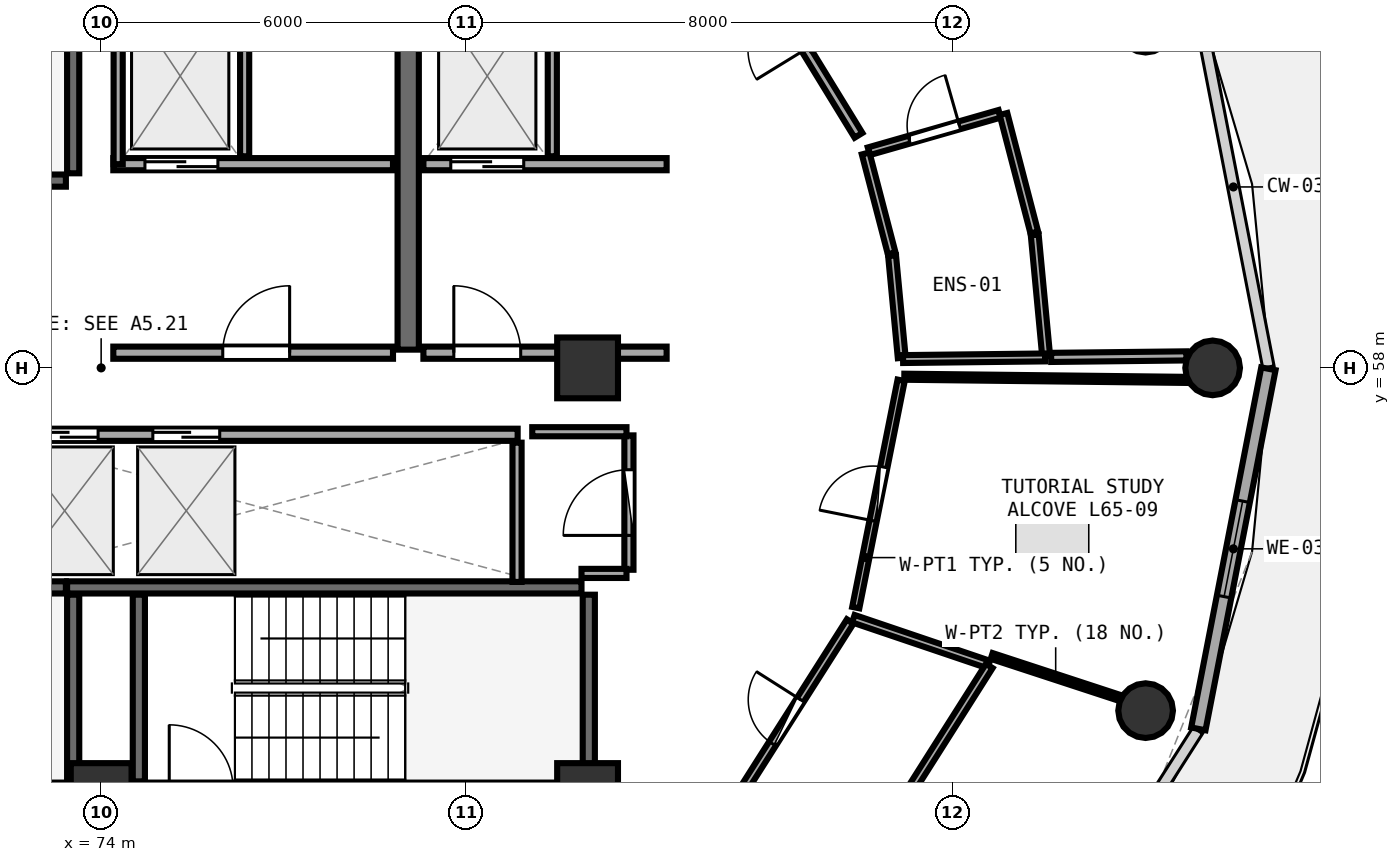
"""IFC4 building model, lengths in metres.
Left out: names, types, materials, properties, quantities, classifications, styles, units other than length and angle.
Written with IfcOpenShell. Run it as: python <this file> out.ifc"""

import sys

from ifc_helpers import new_model, si_unit, direction, frame, frame_2d, origin, origin_2d, place, context, subcontext, project, spatial, rectangle, circle, extrude, element, fill, save


model = new_model("IFC4")
c1 = context("Model", 3, precision=1e-05, world=origin(), true_north=direction((0.0, 1.0)))
c2 = subcontext(c1, "Body", "Model", "MODEL_VIEW")
j1 = project(units=[si_unit("LENGTHUNIT", "METRE"), si_unit("PLANEANGLEUNIT", "RADIAN")], contexts=[c1])
p1 = place(None, origin())
s1 = spatial("IfcSite", under=j1, at=p1, CompositionType="ELEMENT")
p2 = place(p1, origin())
s2 = spatial("IfcBuilding", under=s1, at=p2, CompositionType="ELEMENT")
p3 = place(p2, frame((0.0, 0.0, 256.2)))
s3 = spatial("IfcBuildingStorey", under=s2, at=p3, CompositionType="ELEMENT", Elevation=256.2)
for number, where, z_axis, x_axis in (
    (1, (74.0, 51.0, 0.0), (0.0, 0.0, 1.0), (1.0, 0.0, 0.0)),
    (2, (82.0, 51.0, 0.0), (0.0, 0.0, 1.0), (1.0, 0.0, 0.0)),
    (3, (82.0, 58.0, 0.0), (0.0, 0.0, 1.0), (1.0, 0.0, 0.0)),
):
    element("IfcColumn", number, at=place(p3, frame(where, z_axis=z_axis, x_axis=x_axis)), inside=s3, PredefinedType="PILASTER", context=c2, shape_type="SweptSolid", body=[
        extrude(rectangle(XDim=1.0, YDim=1.0, at=origin_2d()), origin(), (0.0, 0.0, 1.0), 3.75),
    ])
for number, where, z_axis, x_axis in (
    (4, (92.28, 58.0, 0.0), (0.0, 0.0, 1.0), (1.0, 0.0, 0.0)),
    (5, (91.177, 63.636, 0.0), (0.0, 0.0, 1.0), (1.0, 0.0, 0.0)),
    (6, (91.177, 52.364, 0.0), (0.0, 0.0, 1.0), (1.0, 0.0, 0.0)),
):
    element("IfcColumn", number, at=place(p3, frame(where, z_axis=z_axis, x_axis=x_axis)), inside=s3, PredefinedType="COLUMN", context=c2, shape_type="SweptSolid", body=[
        extrude(circle(Radius=0.45, at=origin_2d()), origin(), (0.0, 0.0, 1.0), 3.75),
    ])
p4 = place(p3, frame((92.045, 52.063, 0.0), z_axis=(0.0, 0.0, 1.0), x_axis=(0.190969309115, 0.981596008028, 0.0)))
e7 = element("IfcWall", 7, at=p4, inside=s3, PredefinedType="SOLIDWALL", context=c2, shape_type="SweptSolid", body=[
    extrude(rectangle(XDim=6.033, YDim=0.24, at=frame_2d((3.017, 0.0))), origin(), (0.0, 0.0, 1.0), 3.475),
])
p5 = place(p4, frame((2.216, 0.0, 0.85)))
e8 = element("IfcOpeningElement", 8, at=p5, cuts=e7, PredefinedType="OPENING", context=c2, shape_type="SweptSolid", body=[
    extrude(rectangle(XDim=1.6, YDim=1.45, at=frame_2d((0.8, 0.725))), frame((0.0, 0.13, 0.0), z_axis=(0.0, -1.0, 0.0), x_axis=(1.0, 0.0, 0.0)), (0.0, 0.0, 1.0), 0.26),
])
p6 = place(p3, frame((66.26, 61.08, 0.0), z_axis=(0.0, 0.0, 1.0), x_axis=(1.0, 0.0, 0.0)))
e9 = element("IfcWall", 9, at=p6, inside=s3, PredefinedType="SHEAR", context=c2, shape_type="SweptSolid", body=[
    extrude(rectangle(XDim=7.16, YDim=0.2, at=frame_2d((3.58, 0.0))), origin(), (0.0, 0.0, 1.0), 3.49),
])
for number, where, z_axis, x_axis in (
    (10, (73.54, 61.2, 0.0), (0.0, 0.0, 1.0), (0.0, 1.0, 0.0)),
    (11, (82.02, 51.2, 0.0), (0.0, 0.0, 1.0), (0.0, 1.0, 0.0)),
):
    element("IfcWall", number, at=place(p3, frame(where, z_axis=z_axis, x_axis=x_axis)), inside=s3, PredefinedType="SHEAR", context=c2, shape_type="SweptSolid", body=[
        extrude(rectangle(XDim=3.07, YDim=0.2, at=frame_2d((1.535, 0.0))), origin(), (0.0, 0.0, 1.0), 3.49),
    ])
p7 = place(p3, frame((81.9, 54.39, 0.0), z_axis=(0.0, 0.0, 1.0), x_axis=(-1.0, 0.0, 0.0)))
e12 = element("IfcWall", 12, at=p7, inside=s3, PredefinedType="SHEAR", context=c2, shape_type="SweptSolid", body=[
    extrude(rectangle(XDim=8.46, YDim=0.2, at=frame_2d((4.23, 0.0))), origin(), (0.0, 0.0, 1.0), 3.49),
])
for number, where, z_axis, x_axis in (
    (13, (74.62, 54.27, 0.0), (0.0, 0.0, 1.0), (0.0, -1.0, 0.0)),
    (14, (73.54, 51.2, 0.0), (0.0, 0.0, 1.0), (0.0, 1.0, 0.0)),
):
    element("IfcWall", number, at=place(p3, frame(where, z_axis=z_axis, x_axis=x_axis)), inside=s3, PredefinedType="SHEAR", context=c2, shape_type="SweptSolid", body=[
        extrude(rectangle(XDim=3.07, YDim=0.2, at=frame_2d((1.535, 0.0))), origin(), (0.0, 0.0, 1.0), 3.49),
    ])
p8 = place(p3, frame((73.42, 54.39, 0.0), z_axis=(0.0, 0.0, 1.0), x_axis=(-1.0, 0.0, 0.0)))
e15 = element("IfcWall", 15, at=p8, inside=s3, PredefinedType="SHEAR", context=c2, shape_type="SweptSolid", body=[
    extrude(rectangle(XDim=7.16, YDim=0.2, at=frame_2d((3.58, 0.0))), origin(), (0.0, 0.0, 1.0), 3.49),
])
p9 = place(p3, frame((79.05, 58.3, 0.0), z_axis=(0.0, 0.0, 1.0), x_axis=(0.0, 1.0, 0.0)))
e16 = element("IfcWall", 16, at=p9, inside=s3, PredefinedType="SHEAR", context=c2, shape_type="SweptSolid", body=[
    extrude(rectangle(XDim=6.3, YDim=0.35, at=frame_2d((3.15, 0.0))), origin(), (0.0, 0.0, 1.0), 3.49),
])
p10 = place(p3, frame((74.2, 61.35, 0.0), z_axis=(0.0, 0.0, 1.0), x_axis=(1.0, 0.0, 0.0)))
e17 = element("IfcWall", 17, at=p10, inside=s3, PredefinedType="SOLIDWALL", context=c2, shape_type="SweptSolid", body=[
    extrude(rectangle(XDim=4.6, YDim=0.2, at=frame_2d((2.3, 0.0))), origin(), (0.0, 0.0, 1.0), 3.48),
])
p11 = place(p10, frame((0.52, 0.0, 0.0)))
e18 = element("IfcOpeningElement", 18, at=p11, cuts=e17, PredefinedType="OPENING", context=c2, shape_type="SweptSolid", body=[
    extrude(rectangle(XDim=1.2, YDim=2.15, at=frame_2d((0.6, 1.075))), frame((0.0, 0.11, 0.0), z_axis=(0.0, -1.0, 0.0), x_axis=(1.0, 0.0, 0.0)), (0.0, 0.0, 1.0), 0.22),
])
p12 = place(p3, frame((74.28, 61.35, 0.0), z_axis=(0.0, 0.0, 1.0), x_axis=(0.0, 1.0, 0.0)))
e19 = element("IfcWall", 19, at=p12, inside=s3, PredefinedType="PARTITIONING", context=c2, shape_type="SweptSolid", body=[
    extrude(rectangle(XDim=2.97, YDim=0.15, at=frame_2d((1.485, 0.0))), origin(), (0.0, 0.0, 1.0), 3.48),
])
p13 = place(p3, frame((76.36, 61.48, 0.0), z_axis=(0.0, 0.0, 1.0), x_axis=(0.0, 1.0, 0.0)))
e20 = element("IfcWall", 20, at=p13, inside=s3, PredefinedType="PARTITIONING", context=c2, shape_type="SweptSolid", body=[
    extrude(rectangle(XDim=2.84, YDim=0.15, at=frame_2d((1.42, 0.0))), origin(), (0.0, 0.0, 1.0), 3.48),
])
p14 = place(p3, frame((79.3, 61.35, 0.0), z_axis=(0.0, 0.0, 1.0), x_axis=(1.0, 0.0, 0.0)))
e21 = element("IfcWall", 21, at=p14, inside=s3, PredefinedType="SOLIDWALL", context=c2, shape_type="SweptSolid", body=[
    extrude(rectangle(XDim=4.0, YDim=0.2, at=frame_2d((2.0, 0.0))), origin(), (0.0, 0.0, 1.0), 2.775),
])
p15 = place(p14, frame((0.45, 0.0, 0.0)))
e22 = element("IfcOpeningElement", 22, at=p15, cuts=e21, PredefinedType="OPENING", context=c2, shape_type="SweptSolid", body=[
    extrude(rectangle(XDim=1.2, YDim=2.15, at=frame_2d((0.6, 1.075))), frame((0.0, 0.11, 0.0), z_axis=(0.0, -1.0, 0.0), x_axis=(1.0, 0.0, 0.0)), (0.0, 0.0, 1.0), 0.22),
])
p16 = place(p3, frame((81.42, 61.48, 0.0), z_axis=(0.0, 0.0, 1.0), x_axis=(0.0, 1.0, 0.0)))
e23 = element("IfcWall", 23, at=p16, inside=s3, PredefinedType="PARTITIONING", context=c2, shape_type="SweptSolid", body=[
    extrude(rectangle(XDim=2.84, YDim=0.15, at=frame_2d((1.42, 0.0))), origin(), (0.0, 0.0, 1.0), 3.48),
])
p17 = place(p3, frame((74.2, 58.25, 0.0), z_axis=(0.0, 0.0, 1.0), x_axis=(1.0, 0.0, 0.0)))
e24 = element("IfcWall", 24, at=p17, inside=s3, PredefinedType="SOLIDWALL", context=c2, shape_type="SweptSolid", body=[
    extrude(rectangle(XDim=4.6, YDim=0.2, at=frame_2d((2.3, 0.0))), origin(), (0.0, 0.0, 1.0), 3.48),
])
p18 = place(p17, frame((1.8, 0.0, 0.0)))
e25 = element("IfcOpeningElement", 25, at=p18, cuts=e24, PredefinedType="OPENING", context=c2, shape_type="SweptSolid", body=[
    extrude(rectangle(XDim=1.1, YDim=2.1, at=frame_2d((0.55, 1.05))), frame((0.0, 0.11, 0.0), z_axis=(0.0, -1.0, 0.0), x_axis=(1.0, 0.0, 0.0)), (0.0, 0.0, 1.0), 0.22),
])
p19 = place(p3, frame((79.3, 58.25, 0.0), z_axis=(0.0, 0.0, 1.0), x_axis=(1.0, 0.0, 0.0)))
e26 = element("IfcWall", 26, at=p19, inside=s3, PredefinedType="SOLIDWALL", context=c2, shape_type="SweptSolid", body=[
    extrude(rectangle(XDim=4.0, YDim=0.2, at=frame_2d((2.0, 0.0))), origin(), (0.0, 0.0, 1.0), 2.775),
])
p20 = place(p19, frame((0.5, 0.0, 0.0)))
e27 = element("IfcOpeningElement", 27, at=p20, cuts=e26, PredefinedType="OPENING", context=c2, shape_type="SweptSolid", body=[
    extrude(rectangle(XDim=1.1, YDim=2.1, at=frame_2d((0.55, 1.05))), frame((0.0, 0.11, 0.0), z_axis=(0.0, -1.0, 0.0), x_axis=(1.0, 0.0, 0.0)), (0.0, 0.0, 1.0), 0.22),
])
p21 = place(p3, frame((72.45, 56.9, 0.0), z_axis=(0.0, 0.0, 1.0), x_axis=(1.0, 0.0, 0.0)))
e28 = element("IfcWall", 28, at=p21, inside=s3, PredefinedType="SOLIDWALL", context=c2, shape_type="SweptSolid", body=[
    extrude(rectangle(XDim=8.4, YDim=0.2, at=frame_2d((4.2, 0.0))), origin(), (0.0, 0.0, 1.0), 3.48),
])
p22 = place(p21, frame((0.4, 0.0, 0.0)))
e29 = element("IfcOpeningElement", 29, at=p22, cuts=e28, PredefinedType="OPENING", context=c2, shape_type="SweptSolid", body=[
    extrude(rectangle(XDim=1.1, YDim=2.1, at=frame_2d((0.55, 1.05))), frame((0.0, 0.11, 0.0), z_axis=(0.0, -1.0, 0.0), x_axis=(1.0, 0.0, 0.0)), (0.0, 0.0, 1.0), 0.22),
])
p23 = place(p21, frame((2.4, 0.0, 0.0)))
e30 = element("IfcOpeningElement", 30, at=p23, cuts=e28, PredefinedType="OPENING", context=c2, shape_type="SweptSolid", body=[
    extrude(rectangle(XDim=1.1, YDim=2.1, at=frame_2d((0.55, 1.05))), frame((0.0, 0.11, 0.0), z_axis=(0.0, -1.0, 0.0), x_axis=(1.0, 0.0, 0.0)), (0.0, 0.0, 1.0), 0.22),
])
p24 = place(p3, frame((80.84, 54.48, 0.0), z_axis=(0.0, 0.0, 1.0), x_axis=(0.0, 1.0, 0.0)))
e31 = element("IfcWall", 31, at=p24, inside=s3, PredefinedType="PARTITIONING", context=c2, shape_type="SweptSolid", body=[
    extrude(rectangle(XDim=2.29, YDim=0.15, at=frame_2d((1.145, 0.0))), origin(), (0.0, 0.0, 1.0), 3.48),
])
p25 = place(p3, frame((82.68, 54.68, 0.0), z_axis=(0.0, 0.0, 1.0), x_axis=(0.0, 1.0, 0.0)))
e32 = element("IfcWall", 32, at=p25, inside=s3, PredefinedType="PARTITIONING", context=c2, shape_type="SweptSolid", body=[
    extrude(rectangle(XDim=2.21, YDim=0.15, at=frame_2d((1.105, 0.0))), origin(), (0.0, 0.0, 1.0), 3.48),
])
p26 = place(p25, frame((0.565, 0.0, 0.0)))
e33 = element("IfcOpeningElement", 33, at=p26, cuts=e32, PredefinedType="OPENING", context=c2, shape_type="SweptSolid", body=[
    extrude(rectangle(XDim=1.08, YDim=2.1, at=frame_2d((0.54, 1.05))), frame((0.0, 0.085, 0.0), z_axis=(0.0, -1.0, 0.0), x_axis=(1.0, 0.0, 0.0)), (0.0, 0.0, 1.0), 0.17),
])
p27 = place(p3, frame((86.626, 61.562, 0.0), z_axis=(0.0, 0.0, 1.0), x_axis=(0.961379738838, 0.275225358117, 0.0)))
e34 = element("IfcWall", 34, at=p27, inside=s3, PredefinedType="PLUMBINGWALL", context=c2, shape_type="SweptSolid", body=[
    extrude(rectangle(XDim=2.238, YDim=0.13, at=frame_2d((1.119, 0.0))), origin(), (0.0, 0.0, 1.0), 3.175),
])
p28 = place(p27, frame((0.689, 0.0, 0.0)))
e35 = element("IfcOpeningElement", 35, at=p28, cuts=e34, PredefinedType="OPENING", context=c2, shape_type="SweptSolid", body=[
    extrude(rectangle(XDim=0.86, YDim=2.05, at=frame_2d((0.43, 1.025))), frame((0.0, 0.075, 0.0), z_axis=(0.0, -1.0, 0.0), x_axis=(1.0, 0.0, 0.0)), (0.0, 0.0, 1.0), 0.15),
])
p29 = place(p3, frame((86.456, 61.824, 0.0), z_axis=(0.0, 0.0, 1.0), x_axis=(-0.522665227064, 0.852538011128, 0.0)))
e36 = element("IfcWall", 36, at=p29, inside=s3, PredefinedType="PARTITIONING", context=c2, shape_type="SweptSolid", body=[
    extrude(rectangle(XDim=4.273, YDim=0.15, at=frame_2d((2.136, 0.0))), origin(), (0.0, 0.0, 1.0), 3.075),
])
p30 = place(p29, frame((1.661, 0.0, 0.0)))
e37 = element("IfcOpeningElement", 37, at=p30, cuts=e36, PredefinedType="OPENING", context=c2, shape_type="SweptSolid", body=[
    extrude(rectangle(XDim=0.95, YDim=2.08, at=frame_2d((0.475, 1.04))), frame((0.0, 0.085, 0.0), z_axis=(0.0, -1.0, 0.0), x_axis=(1.0, 0.0, 0.0)), (0.0, 0.0, 1.0), 0.17),
])
p31 = place(p3, frame((84.223, 50.533, 0.0), z_axis=(0.0, 0.0, 1.0), x_axis=(0.536434868975, 0.84394172272, 0.0)))
e38 = element("IfcWall", 38, at=p31, inside=s3, PredefinedType="PLUMBINGWALL", context=c2, shape_type="SweptSolid", body=[
    extrude(rectangle(XDim=3.908, YDim=0.13, at=frame_2d((1.954, 0.0))), origin(), (0.0, 0.0, 1.0), 3.075),
])
p32 = place(p31, frame((1.524, 0.0, 0.0)))
e39 = element("IfcOpeningElement", 39, at=p32, cuts=e38, PredefinedType="OPENING", context=c2, shape_type="SweptSolid", body=[
    extrude(rectangle(XDim=0.86, YDim=2.05, at=frame_2d((0.43, 1.025))), frame((0.0, 0.075, 0.0), z_axis=(0.0, -1.0, 0.0), x_axis=(1.0, 0.0, 0.0)), (0.0, 0.0, 1.0), 0.15),
])
p33 = place(p3, frame((86.411, 54.058, 0.0), z_axis=(0.0, 0.0, 1.0), x_axis=(0.195845174173, 0.980634828952, 0.0)))
e40 = element("IfcWall", 40, at=p33, inside=s3, PredefinedType="PARTITIONING", context=c2, shape_type="SweptSolid", body=[
    extrude(rectangle(XDim=3.812, YDim=0.12, at=frame_2d((1.906, 0.0))), origin(), (0.0, 0.0, 1.0), 3.48),
])
p34 = place(p33, frame((1.456, 0.0, 0.0)))
e41 = element("IfcOpeningElement", 41, at=p34, cuts=e40, PredefinedType="OPENING", context=c2, shape_type="SweptSolid", body=[
    extrude(rectangle(XDim=0.9, YDim=2.08, at=frame_2d((0.45, 1.04))), frame((0.0, 0.07, 0.0), z_axis=(0.0, -1.0, 0.0), x_axis=(1.0, 0.0, 0.0)), (0.0, 0.0, 1.0), 0.14),
])
p35 = place(p3, frame((81.9, 54.62, 0.0), z_axis=(0.0, 0.0, 1.0), x_axis=(1.0, 0.0, 0.0)))
e42 = element("IfcWall", 42, at=p35, inside=s3, PredefinedType="PARTITIONING", context=c2, shape_type="SweptSolid", body=[
    extrude(rectangle(XDim=0.74, YDim=0.15, at=frame_2d((0.37, 0.0))), origin(), (0.0, 0.0, 1.0), 2.775),
])
p36 = place(p3, frame((82.64, 56.95, 0.0), z_axis=(0.0, 0.0, 1.0), x_axis=(-1.0, 0.0, 0.0)))
e43 = element("IfcWall", 43, at=p36, inside=s3, PredefinedType="PARTITIONING", context=c2, shape_type="SweptSolid", body=[
    extrude(rectangle(XDim=1.55, YDim=0.15, at=frame_2d((0.775, 0.0))), origin(), (0.0, 0.0, 1.0), 2.775),
])
p37 = place(p3, frame((87.167, 58.165, 0.0), z_axis=(0.0, 0.0, 1.0), x_axis=(-0.094303984979, 0.995543448784, 0.0)))
e44 = element("IfcWall", 44, at=p37, inside=s3, PredefinedType="PLUMBINGWALL", context=c2, shape_type="SweptSolid", body=[
    extrude(rectangle(XDim=1.688, YDim=0.13, at=frame_2d((0.844, 0.0))), origin(), (0.0, 0.0, 1.0), 3.075),
])
p38 = place(p3, frame((87.001, 59.885, 0.0), z_axis=(0.0, 0.0, 1.0), x_axis=(-0.252205193656, 0.967673777826, 0.0)))
e45 = element("IfcWall", 45, at=p38, inside=s3, PredefinedType="PLUMBINGWALL", context=c2, shape_type="SweptSolid", body=[
    extrude(rectangle(XDim=1.697, YDim=0.13, at=frame_2d((0.849, 0.0))), origin(), (0.0, 0.0, 1.0), 3.48),
])
p39 = place(p3, frame((88.84, 62.176, 0.0), z_axis=(0.0, 0.0, 1.0), x_axis=(0.251652018774, -0.967817783184, 0.0)))
e46 = element("IfcWall", 46, at=p39, inside=s3, PredefinedType="PLUMBINGWALL", context=c2, shape_type="SweptSolid", body=[
    extrude(rectangle(XDim=2.014, YDim=0.13, at=frame_2d((1.007, 0.0))), origin(), (0.0, 0.0, 1.0), 3.48),
])
p40 = place(p3, frame((89.354, 60.187, 0.0), z_axis=(0.0, 0.0, 1.0), x_axis=(0.09380867442, -0.995590243325, 0.0)))
e47 = element("IfcWall", 47, at=p40, inside=s3, PredefinedType="PLUMBINGWALL", context=c2, shape_type="SweptSolid", body=[
    extrude(rectangle(XDim=2.004, YDim=0.13, at=frame_2d((1.002, 0.0))), origin(), (0.0, 0.0, 1.0), 3.48),
])
p41 = place(p3, frame((89.524, 58.172, 0.0), z_axis=(0.0, 0.0, 1.0), x_axis=(-0.999935061604, -0.011396164964, 0.0)))
e48 = element("IfcWall", 48, at=p41, inside=s3, PredefinedType="PLUMBINGWALL", context=c2, shape_type="SweptSolid", body=[
    extrude(rectangle(XDim=2.335, YDim=0.13, at=frame_2d((1.167, 0.0))), origin(), (0.0, 0.0, 1.0), 3.075),
])
p42 = place(p3, frame((91.848, 58.198, 0.0), z_axis=(0.0, 0.0, 1.0), x_axis=(-0.999936076373, -0.011306775263, 0.0)))
e49 = element("IfcWall", 49, at=p42, inside=s3, PredefinedType="PARTITIONING", context=c2, shape_type="SweptSolid", body=[
    extrude(rectangle(XDim=2.224, YDim=0.15, at=frame_2d((1.112, 0.0))), origin(), (0.0, 0.0, 1.0), 3.075),
])
p43 = place(p3, frame((86.371, 53.875, 0.0), z_axis=(0.0, 0.0, 1.0), x_axis=(0.947177643747, -0.320709387431, 0.0)))
e50 = element("IfcWall", 50, at=p43, inside=s3, PredefinedType="PLUMBINGWALL", context=c2, shape_type="SweptSolid", body=[
    extrude(rectangle(XDim=2.352, YDim=0.13, at=frame_2d((1.176, 0.0))), origin(), (0.0, 0.0, 1.0), 3.175),
])
p44 = place(p3, frame((88.606, 53.098, 0.0), z_axis=(0.0, 0.0, 1.0), x_axis=(-0.535433501212, -0.844577388864, 0.0)))
e51 = element("IfcWall", 51, at=p44, inside=s3, PredefinedType="PLUMBINGWALL", context=c2, shape_type="SweptSolid", body=[
    extrude(rectangle(XDim=4.735, YDim=0.13, at=frame_2d((2.368, 0.0))), origin(), (0.0, 0.0, 1.0), 3.075),
])
p45 = place(p3, frame((87.209, 57.854, 0.0), z_axis=(0.0, 0.0, 1.0), x_axis=(0.999937174585, -0.01120923205, 0.0)))
e52 = element("IfcWall", 52, at=p45, inside=s3, PredefinedType="PARTITIONING", context=c2, shape_type="SweptSolid", body=[
    extrude(rectangle(XDim=4.639, YDim=0.1, at=frame_2d((2.32, 0.0))), origin(), (0.0, 0.0, 1.0), 3.075),
])
p46 = place(p3, frame((90.751, 52.573, 0.0), z_axis=(0.0, 0.0, 1.0), x_axis=(-0.950301719956, 0.311330437073, 0.0)))
e53 = element("IfcWall", 53, at=p46, inside=s3, PredefinedType="PARTITIONING", context=c2, shape_type="SweptSolid", body=[
    extrude(rectangle(XDim=2.215, YDim=0.1, at=frame_2d((1.108, 0.0))), origin(), (0.0, 0.0, 1.0), 3.235),
])
p47 = place(p5, origin())
e54 = element("IfcWindow", 54, at=p47, inside=s3, PartitioningType="SINGLE_PANEL", PredefinedType="WINDOW", context=c2, shape_type="SweptSolid", body=[
    extrude(rectangle(XDim=1.6, YDim=1.45, at=frame_2d((0.8, 0.725))), frame((0.0, 0.03, 0.0), z_axis=(0.0, -1.0, 0.0), x_axis=(1.0, 0.0, 0.0)), (0.0, 0.0, 1.0), 0.06),
])
fill(e8, e54)
p48 = place(p11, origin())
e55 = element("IfcDoor", 55, at=p48, inside=s3, OperationType="DOUBLE_DOOR_SLIDING", PredefinedType="DOOR", context=c2, shape_type="SweptSolid", body=[
    extrude(rectangle(XDim=1.2, YDim=2.15, at=frame_2d((0.6, 1.075))), frame((0.0, 0.025, 0.0), z_axis=(0.0, -1.0, 0.0), x_axis=(1.0, 0.0, 0.0)), (0.0, 0.0, 1.0), 0.05),
])
fill(e18, e55)
p49 = place(p15, origin())
e56 = element("IfcDoor", 56, at=p49, inside=s3, OperationType="DOUBLE_DOOR_SLIDING", PredefinedType="DOOR", context=c2, shape_type="SweptSolid", body=[
    extrude(rectangle(XDim=1.2, YDim=2.15, at=frame_2d((0.6, 1.075))), frame((0.0, 0.025, 0.0), z_axis=(0.0, -1.0, 0.0), x_axis=(1.0, 0.0, 0.0)), (0.0, 0.0, 1.0), 0.05),
])
fill(e22, e56)
p50 = place(p18, frame((1.1, 0.0, 0.0), z_axis=(0.0, 0.0, 1.0), x_axis=(-1.0, 0.0, 0.0)))
e57 = element("IfcDoor", 57, at=p50, inside=s3, OperationType="SINGLE_SWING_LEFT", PredefinedType="DOOR", context=c2, shape_type="SweptSolid", body=[
    extrude(rectangle(XDim=1.1, YDim=2.1, at=frame_2d((0.55, 1.05))), frame((0.0, 0.025, 0.0), z_axis=(0.0, -1.0, 0.0), x_axis=(1.0, 0.0, 0.0)), (0.0, 0.0, 1.0), 0.05),
])
fill(e25, e57)
p51 = place(p20, frame((1.1, 0.0, 0.0), z_axis=(0.0, 0.0, 1.0), x_axis=(-1.0, 0.0, 0.0)))
e58 = element("IfcDoor", 58, at=p51, inside=s3, OperationType="SINGLE_SWING_RIGHT", PredefinedType="DOOR", context=c2, shape_type="SweptSolid", body=[
    extrude(rectangle(XDim=1.1, YDim=2.1, at=frame_2d((0.55, 1.05))), frame((0.0, 0.025, 0.0), z_axis=(0.0, -1.0, 0.0), x_axis=(1.0, 0.0, 0.0)), (0.0, 0.0, 1.0), 0.05),
])
fill(e27, e58)
p52 = place(p22, origin())
e59 = element("IfcDoor", 59, at=p52, inside=s3, OperationType="DOUBLE_DOOR_SLIDING", PredefinedType="DOOR", context=c2, shape_type="SweptSolid", body=[
    extrude(rectangle(XDim=1.1, YDim=2.1, at=frame_2d((0.55, 1.05))), frame((0.0, 0.025, 0.0), z_axis=(0.0, -1.0, 0.0), x_axis=(1.0, 0.0, 0.0)), (0.0, 0.0, 1.0), 0.05),
])
fill(e29, e59)
p53 = place(p23, origin())
e60 = element("IfcDoor", 60, at=p53, inside=s3, OperationType="DOUBLE_DOOR_SLIDING", PredefinedType="DOOR", context=c2, shape_type="SweptSolid", body=[
    extrude(rectangle(XDim=1.1, YDim=2.1, at=frame_2d((0.55, 1.05))), frame((0.0, 0.025, 0.0), z_axis=(0.0, -1.0, 0.0), x_axis=(1.0, 0.0, 0.0)), (0.0, 0.0, 1.0), 0.05),
])
fill(e30, e60)
p54 = place(p26, origin())
e61 = element("IfcDoor", 61, at=p54, inside=s3, OperationType="SINGLE_SWING_LEFT", PredefinedType="DOOR", context=c2, shape_type="SweptSolid", body=[
    extrude(rectangle(XDim=1.08, YDim=2.1, at=frame_2d((0.54, 1.05))), frame((0.0, 0.025, 0.0), z_axis=(0.0, -1.0, 0.0), x_axis=(1.0, 0.0, 0.0)), (0.0, 0.0, 1.0), 0.05),
])
fill(e33, e61)
p55 = place(p28, origin())
e62 = element("IfcDoor", 62, at=p55, inside=s3, OperationType="SINGLE_SWING_RIGHT", PredefinedType="DOOR", context=c2, shape_type="SweptSolid", body=[
    extrude(rectangle(XDim=0.86, YDim=2.05, at=frame_2d((0.43, 1.025))), frame((0.0, 0.025, 0.0), z_axis=(0.0, -1.0, 0.0), x_axis=(1.0, 0.0, 0.0)), (0.0, 0.0, 1.0), 0.05),
])
fill(e35, e62)
p56 = place(p32, origin())
e63 = element("IfcDoor", 63, at=p56, inside=s3, OperationType="SINGLE_SWING_RIGHT", PredefinedType="DOOR", context=c2, shape_type="SweptSolid", body=[
    extrude(rectangle(XDim=0.86, YDim=2.05, at=frame_2d((0.43, 1.025))), frame((0.0, 0.025, 0.0), z_axis=(0.0, -1.0, 0.0), x_axis=(1.0, 0.0, 0.0)), (0.0, 0.0, 1.0), 0.05),
])
fill(e39, e63)
p57 = place(p34, origin())
e64 = element("IfcDoor", 64, at=p57, inside=s3, OperationType="SINGLE_SWING_LEFT", PredefinedType="DOOR", context=c2, shape_type="SweptSolid", body=[
    extrude(rectangle(XDim=0.9, YDim=2.08, at=frame_2d((0.45, 1.04))), frame((0.0, 0.025, 0.0), z_axis=(0.0, -1.0, 0.0), x_axis=(1.0, 0.0, 0.0)), (0.0, 0.0, 1.0), 0.05),
])
fill(e41, e64)
save(model, sys.argv[1])
